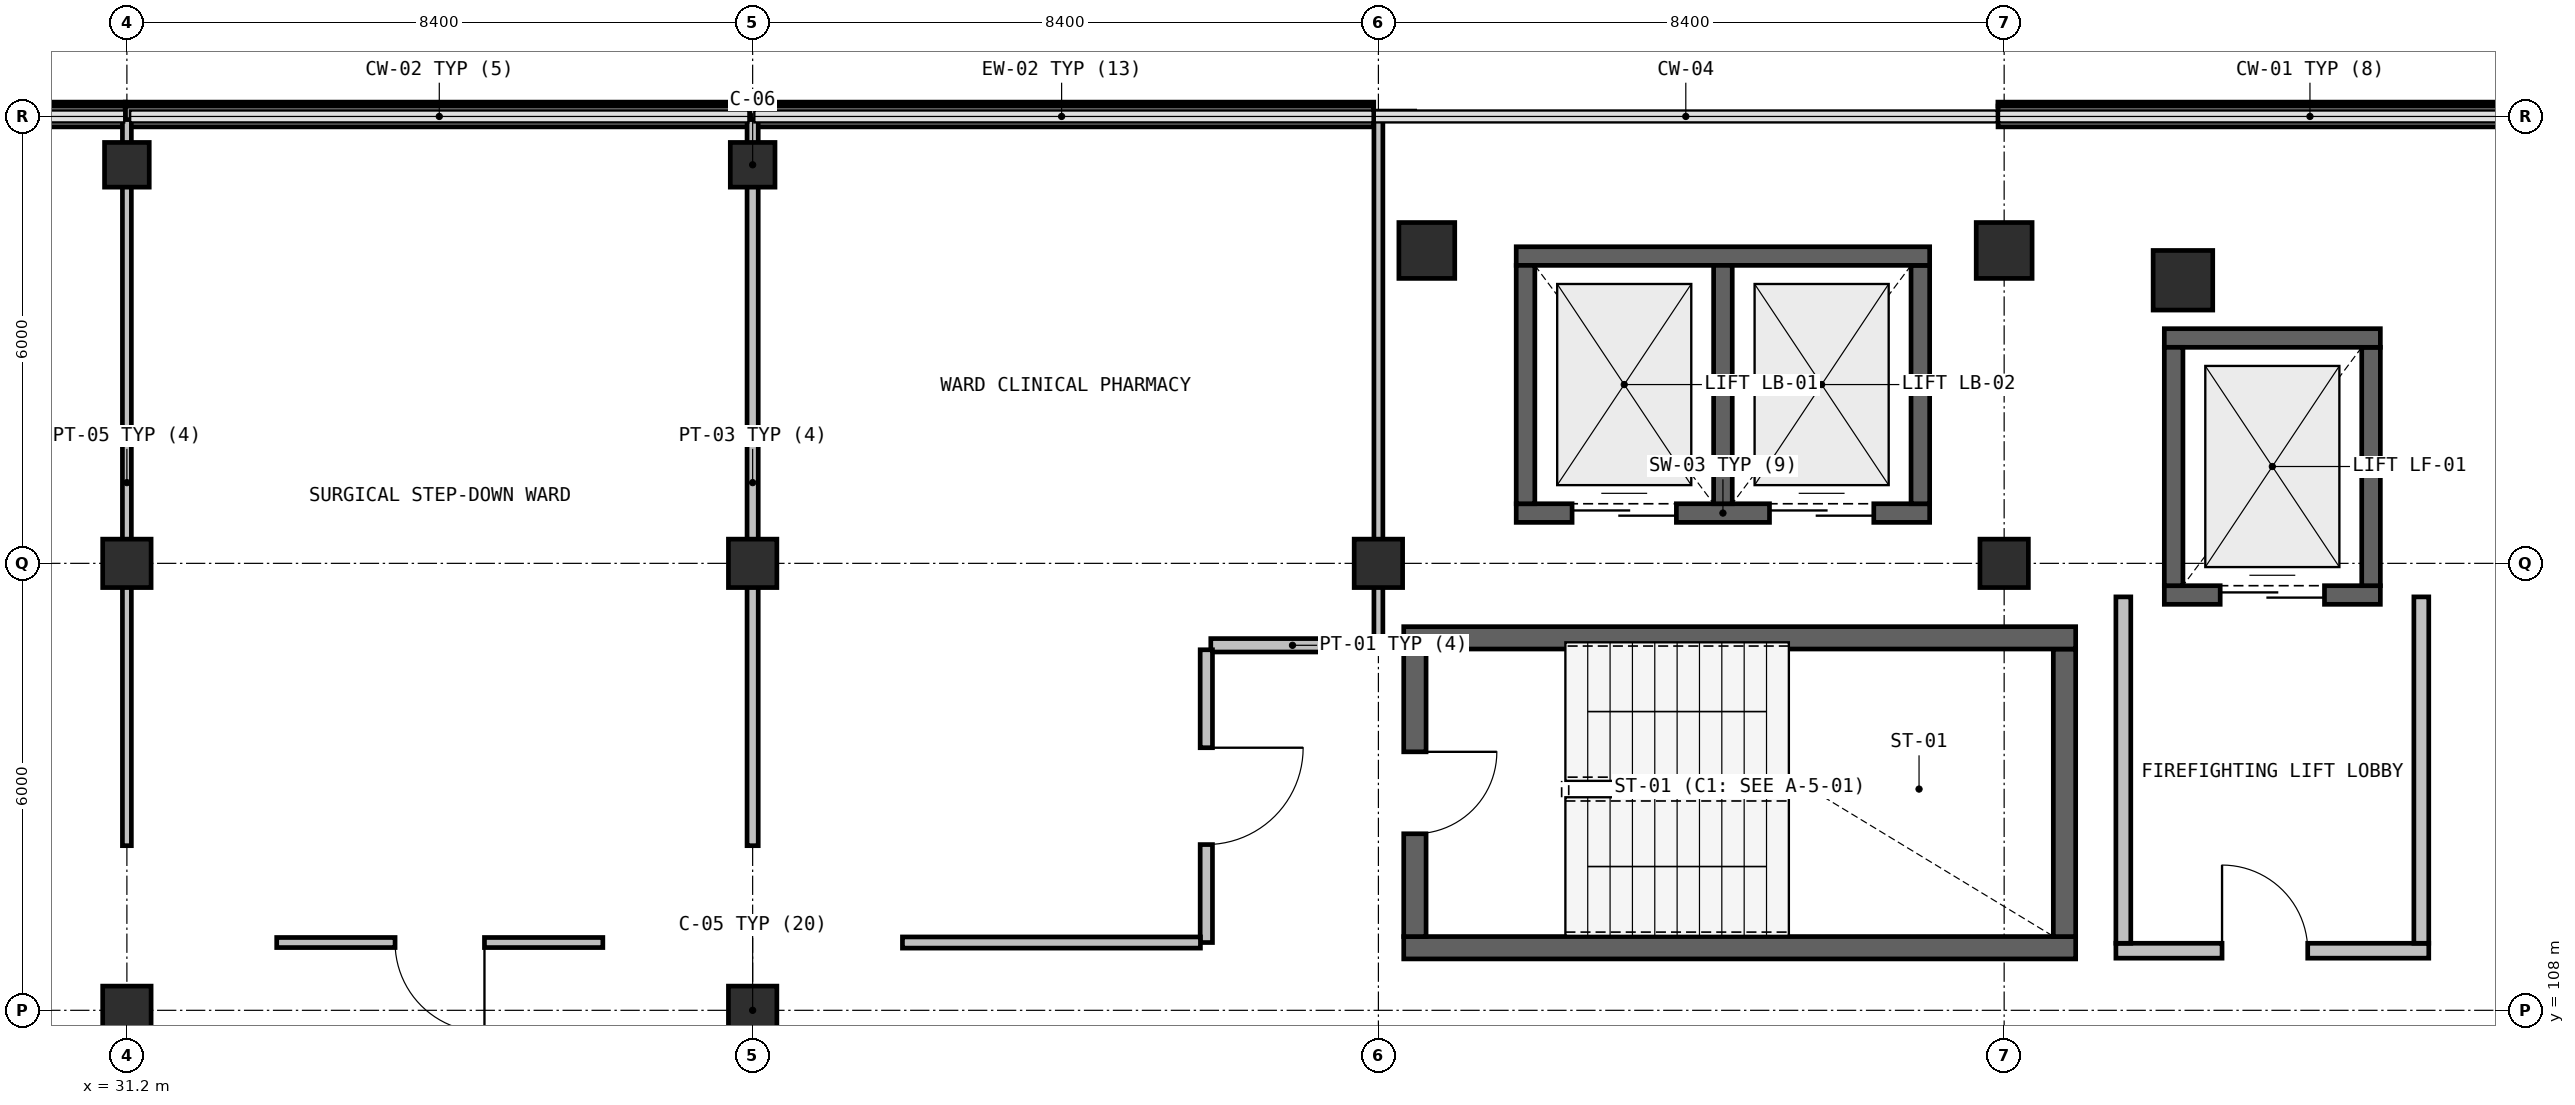
"""IFC4 building model, lengths in metres.
Left out: names, types, materials, properties, quantities, classifications, styles, units other than length and angle.
Written with IfcOpenShell. Run it as: python <this file> out.ifc"""

import sys

from ifc_helpers import new_model, si_unit, direction, frame, frame_2d, origin, origin_2d, place, context, subcontext, project, spatial, rectangle, extrude, element, fill, save


model = new_model("IFC4")
c1 = context("Model", 3, precision=1e-05, world=origin(), true_north=direction((0.0, 1.0)))
c2 = subcontext(c1, "Body", "Model", "MODEL_VIEW")
j1 = project(units=[si_unit("LENGTHUNIT", "METRE"), si_unit("PLANEANGLEUNIT", "RADIAN")], contexts=[c1])
p1 = place(None, origin())
s1 = spatial("IfcSite", under=j1, at=p1, CompositionType="ELEMENT")
p2 = place(p1, origin())
s2 = spatial("IfcBuilding", under=s1, at=p2, CompositionType="ELEMENT")
p3 = place(p2, frame((0.0, 0.0, 23.25)))
s3 = spatial("IfcBuildingStorey", under=s2, at=p3, CompositionType="ELEMENT", Elevation=23.25)
p4 = place(p3, frame((58.8, 117.8, 0.0), z_axis=(0.0, 0.0, 1.0), x_axis=(1.0, 0.0, 0.0)))
e1 = element("IfcColumn", 1, at=p4, inside=s3, PredefinedType="COLUMN", context=c2, shape_type="SweptSolid", body=[
    extrude(rectangle(XDim=0.8, YDim=0.8, at=origin_2d()), origin(), (0.0, 0.0, 1.0), 4.05),
])
for number, where, z_axis, x_axis in (
    (2, (48.65, 118.2, 0.0), (0.0, 0.0, 1.0), (1.0, 0.0, 0.0)),
    (3, (56.4, 118.2, 0.0), (0.0, 0.0, 1.0), (1.0, 0.0, 0.0)),
):
    element("IfcColumn", number, at=place(p3, frame(where, z_axis=z_axis, x_axis=x_axis)), inside=s3, PredefinedType="COLUMN", context=c2, shape_type="SweptSolid", body=[
        extrude(rectangle(XDim=0.75, YDim=0.75, at=origin_2d()), origin(), (0.0, 0.0, 1.0), 4.05),
    ])
for number, where, z_axis, x_axis in (
    (4, (31.2, 108.0, 0.0), (0.0, 0.0, 1.0), (1.0, 0.0, 0.0)),
    (5, (31.2, 114.0, 0.0), (0.0, 0.0, 1.0), (1.0, 0.0, 0.0)),
):
    element("IfcColumn", number, at=place(p3, frame(where, z_axis=z_axis, x_axis=x_axis)), inside=s3, PredefinedType="COLUMN", context=c2, shape_type="SweptSolid", body=[
        extrude(rectangle(XDim=0.65, YDim=0.65, at=origin_2d()), origin(), (0.0, 0.0, 1.0), 4.05),
    ])
p5 = place(p3, frame((31.2, 119.35, 0.0), z_axis=(0.0, 0.0, 1.0), x_axis=(1.0, 0.0, 0.0)))
e6 = element("IfcColumn", 6, at=p5, inside=s3, PredefinedType="COLUMN", context=c2, shape_type="SweptSolid", body=[
    extrude(rectangle(XDim=0.6, YDim=0.6, at=origin_2d()), origin(), (0.0, 0.0, 1.0), 4.05),
])
for number, where, z_axis, x_axis in (
    (7, (39.6, 108.0, 0.0), (0.0, 0.0, 1.0), (1.0, 0.0, 0.0)),
    (8, (39.6, 114.0, 0.0), (0.0, 0.0, 1.0), (1.0, 0.0, 0.0)),
):
    element("IfcColumn", number, at=place(p3, frame(where, z_axis=z_axis, x_axis=x_axis)), inside=s3, PredefinedType="COLUMN", context=c2, shape_type="SweptSolid", body=[
        extrude(rectangle(XDim=0.65, YDim=0.65, at=origin_2d()), origin(), (0.0, 0.0, 1.0), 4.05),
    ])
p6 = place(p3, frame((39.6, 119.35, 0.0), z_axis=(0.0, 0.0, 1.0), x_axis=(1.0, 0.0, 0.0)))
e9 = element("IfcColumn", 9, at=p6, inside=s3, PredefinedType="COLUMN", context=c2, shape_type="SweptSolid", body=[
    extrude(rectangle(XDim=0.6, YDim=0.6, at=origin_2d()), origin(), (0.0, 0.0, 1.0), 4.05),
])
for number, where, z_axis, x_axis in (
    (10, (48.0, 114.0, 0.0), (0.0, 0.0, 1.0), (1.0, 0.0, 0.0)),
    (11, (56.4, 114.0, 0.0), (0.0, 0.0, 1.0), (1.0, 0.0, 0.0)),
):
    element("IfcColumn", number, at=place(p3, frame(where, z_axis=z_axis, x_axis=x_axis)), inside=s3, PredefinedType="COLUMN", context=c2, shape_type="SweptSolid", body=[
        extrude(rectangle(XDim=0.65, YDim=0.65, at=origin_2d()), origin(), (0.0, 0.0, 1.0), 4.05),
    ])
p7 = place(p3, frame((22.94, 119.999, 0.0), z_axis=(0.0, 0.0, 1.0), x_axis=(1.0, 0.0, 0.0)))
e12 = element("IfcWall", 12, at=p7, inside=s3, PredefinedType="SOLIDWALL", context=c2, shape_type="SweptSolid", body=[
    extrude(rectangle(XDim=8.237, YDim=0.28, at=frame_2d((4.119, 0.0))), origin(), (0.0, 0.0, 1.0), 0.94),
])
for number, where, z_axis, x_axis in (
    (13, (31.181, 119.999, 0.0), (0.0, 0.0, 1.0), (1.0, 0.0, 0.0)),
    (14, (39.56, 119.999, 0.0), (0.0, 0.0, 1.0), (1.0, 0.0, 0.0)),
):
    element("IfcWall", number, at=place(p3, frame(where, z_axis=z_axis, x_axis=x_axis)), inside=s3, PredefinedType="SOLIDWALL", context=c2, shape_type="SweptSolid", body=[
        extrude(rectangle(XDim=8.375, YDim=0.28, at=frame_2d((4.188, 0.0))), origin(), (0.0, 0.0, 1.0), 0.94),
    ])
p8 = place(p3, frame((56.318, 119.999, 0.0), z_axis=(0.0, 0.0, 1.0), x_axis=(1.0, 0.0, 0.0)))
e15 = element("IfcWall", 15, at=p8, inside=s3, PredefinedType="SOLIDWALL", context=c2, shape_type="SweptSolid", body=[
    extrude(rectangle(XDim=8.374, YDim=0.28, at=frame_2d((4.187, 0.0))), origin(), (0.0, 0.0, 1.0), 0.94),
])
p9 = place(p3, frame((48.34, 108.84, 0.0), z_axis=(0.0, 0.0, 1.0), x_axis=(1.0, 0.0, 0.0)))
e16 = element("IfcWall", 16, at=p9, inside=s3, PredefinedType="SHEAR", context=c2, shape_type="SweptSolid", body=[
    extrude(rectangle(XDim=9.02, YDim=0.3, at=frame_2d((4.51, 0.0))), origin(), (0.0, 0.0, 1.0), 3.775),
])
p10 = place(p3, frame((57.21, 108.99, 0.0), z_axis=(0.0, 0.0, 1.0), x_axis=(0.0, 1.0, 0.0)))
e17 = element("IfcWall", 17, at=p10, inside=s3, PredefinedType="SHEAR", context=c2, shape_type="SweptSolid", body=[
    extrude(rectangle(XDim=3.86, YDim=0.3, at=frame_2d((1.93, 0.0))), origin(), (0.0, 0.0, 1.0), 3.775),
])
p11 = place(p3, frame((57.36, 113.0, 0.0), z_axis=(0.0, 0.0, 1.0), x_axis=(-1.0, 0.0, 0.0)))
e18 = element("IfcWall", 18, at=p11, inside=s3, PredefinedType="SHEAR", context=c2, shape_type="SweptSolid", body=[
    extrude(rectangle(XDim=9.02, YDim=0.3, at=frame_2d((4.51, 0.0))), origin(), (0.0, 0.0, 1.0), 3.775),
])
p12 = place(p3, frame((48.49, 112.85, 0.0), z_axis=(0.0, 0.0, 1.0), x_axis=(0.0, -1.0, 0.0)))
e19 = element("IfcWall", 19, at=p12, inside=s3, PredefinedType="SHEAR", context=c2, shape_type="SweptSolid", body=[
    extrude(rectangle(XDim=3.86, YDim=0.3, at=frame_2d((1.93, 0.0))), origin(), (0.0, 0.0, 1.0), 3.775),
])
p13 = place(p12, frame((1.38, 0.0, 0.0)))
e20 = element("IfcOpeningElement", 20, at=p13, cuts=e19, PredefinedType="OPENING", context=c2, shape_type="SweptSolid", body=[
    extrude(rectangle(XDim=1.1, YDim=2.15, at=frame_2d((0.55, 1.075))), frame((0.0, 0.16, 0.0), z_axis=(0.0, -1.0, 0.0), x_axis=(1.0, 0.0, 0.0)), (0.0, 0.0, 1.0), 0.32),
])
p14 = place(p3, frame((57.9, 108.8, 0.0), z_axis=(0.0, 0.0, 1.0), x_axis=(1.0, 0.0, 0.0)))
e21 = element("IfcWall", 21, at=p14, inside=s3, PredefinedType="SOLIDWALL", context=c2, shape_type="SweptSolid", body=[
    extrude(rectangle(XDim=4.2, YDim=0.2, at=frame_2d((2.1, 0.0))), origin(), (0.0, 0.0, 1.0), 3.775),
])
p15 = place(p14, frame((1.425, 0.0, 0.0)))
e22 = element("IfcOpeningElement", 22, at=p15, cuts=e21, PredefinedType="OPENING", context=c2, shape_type="SweptSolid", body=[
    extrude(rectangle(XDim=1.15, YDim=2.15, at=frame_2d((0.575, 1.075))), frame((0.0, 0.11, 0.0), z_axis=(0.0, -1.0, 0.0), x_axis=(1.0, 0.0, 0.0)), (0.0, 0.0, 1.0), 0.22),
])
for number, where, z_axis, x_axis in (
    (23, (62.0, 108.9, 0.0), (0.0, 0.0, 1.0), (0.0, 1.0, 0.0)),
    (24, (58.0, 113.55, 0.0), (0.0, 0.0, 1.0), (0.0, -1.0, 0.0)),
):
    element("IfcWall", number, at=place(p3, frame(where, z_axis=z_axis, x_axis=x_axis)), inside=s3, PredefinedType="SOLIDWALL", context=c2, shape_type="SweptSolid", body=[
        extrude(rectangle(XDim=4.65, YDim=0.2, at=frame_2d((2.325, 0.0))), origin(), (0.0, 0.0, 1.0), 3.775),
    ])
p16 = place(p3, frame((58.55, 113.575, 0.0), z_axis=(0.0, 0.0, 1.0), x_axis=(1.0, 0.0, 0.0)))
e25 = element("IfcWall", 25, at=p16, inside=s3, PredefinedType="SHEAR", context=c2, shape_type="SweptSolid", body=[
    extrude(rectangle(XDim=2.9, YDim=0.25, at=frame_2d((1.45, 0.0))), origin(), (0.0, 0.0, 1.0), 3.775),
])
p17 = place(p16, frame((0.75, 0.0, 0.0)))
e26 = element("IfcOpeningElement", 26, at=p17, cuts=e25, PredefinedType="OPENING", context=c2, shape_type="SweptSolid", body=[
    extrude(rectangle(XDim=1.4, YDim=2.15, at=frame_2d((0.7, 1.075))), frame((0.0, 0.135, 0.0), z_axis=(0.0, -1.0, 0.0), x_axis=(1.0, 0.0, 0.0)), (0.0, 0.0, 1.0), 0.27),
])
p18 = place(p3, frame((61.325, 113.7, 0.0), z_axis=(0.0, 0.0, 1.0), x_axis=(0.0, 1.0, 0.0)))
e27 = element("IfcWall", 27, at=p18, inside=s3, PredefinedType="SHEAR", context=c2, shape_type="SweptSolid", body=[
    extrude(rectangle(XDim=3.2, YDim=0.25, at=frame_2d((1.6, 0.0))), origin(), (0.0, 0.0, 1.0), 3.775),
])
p19 = place(p3, frame((61.45, 117.025, 0.0), z_axis=(0.0, 0.0, 1.0), x_axis=(-1.0, 0.0, 0.0)))
e28 = element("IfcWall", 28, at=p19, inside=s3, PredefinedType="SHEAR", context=c2, shape_type="SweptSolid", body=[
    extrude(rectangle(XDim=2.9, YDim=0.25, at=frame_2d((1.45, 0.0))), origin(), (0.0, 0.0, 1.0), 3.775),
])
p20 = place(p3, frame((58.675, 116.9, 0.0), z_axis=(0.0, 0.0, 1.0), x_axis=(0.0, -1.0, 0.0)))
e29 = element("IfcWall", 29, at=p20, inside=s3, PredefinedType="SHEAR", context=c2, shape_type="SweptSolid", body=[
    extrude(rectangle(XDim=3.2, YDim=0.25, at=frame_2d((1.6, 0.0))), origin(), (0.0, 0.0, 1.0), 3.775),
])
p21 = place(p3, frame((49.85, 114.675, 0.0), z_axis=(0.0, 0.0, 1.0), x_axis=(1.0, 0.0, 0.0)))
e30 = element("IfcWall", 30, at=p21, inside=s3, PredefinedType="SHEAR", context=c2, shape_type="SweptSolid", body=[
    extrude(rectangle(XDim=5.55, YDim=0.25, at=frame_2d((2.775, 0.0))), origin(), (0.0, 0.0, 1.0), 3.775),
])
p22 = place(p21, frame((0.75, 0.0, 0.0)))
e31 = element("IfcOpeningElement", 31, at=p22, cuts=e30, PredefinedType="OPENING", context=c2, shape_type="SweptSolid", body=[
    extrude(rectangle(XDim=1.4, YDim=2.2, at=frame_2d((0.7, 1.1))), frame((0.0, 0.135, 0.0), z_axis=(0.0, -1.0, 0.0), x_axis=(1.0, 0.0, 0.0)), (0.0, 0.0, 1.0), 0.27),
])
p23 = place(p21, frame((3.4, 0.0, 0.0)))
e32 = element("IfcOpeningElement", 32, at=p23, cuts=e30, PredefinedType="OPENING", context=c2, shape_type="SweptSolid", body=[
    extrude(rectangle(XDim=1.4, YDim=2.2, at=frame_2d((0.7, 1.1))), frame((0.0, 0.135, 0.0), z_axis=(0.0, -1.0, 0.0), x_axis=(1.0, 0.0, 0.0)), (0.0, 0.0, 1.0), 0.27),
])
p24 = place(p3, frame((55.275, 114.8, 0.0), z_axis=(0.0, 0.0, 1.0), x_axis=(0.0, 1.0, 0.0)))
e33 = element("IfcWall", 33, at=p24, inside=s3, PredefinedType="SHEAR", context=c2, shape_type="SweptSolid", body=[
    extrude(rectangle(XDim=3.2, YDim=0.25, at=frame_2d((1.6, 0.0))), origin(), (0.0, 0.0, 1.0), 3.775),
])
p25 = place(p3, frame((55.4, 118.125, 0.0), z_axis=(0.0, 0.0, 1.0), x_axis=(-1.0, 0.0, 0.0)))
e34 = element("IfcWall", 34, at=p25, inside=s3, PredefinedType="SHEAR", context=c2, shape_type="SweptSolid", body=[
    extrude(rectangle(XDim=5.55, YDim=0.25, at=frame_2d((2.775, 0.0))), origin(), (0.0, 0.0, 1.0), 3.775),
])
for number, where, z_axis, x_axis in (
    (35, (49.975, 118.0, 0.0), (0.0, 0.0, 1.0), (0.0, -1.0, 0.0)),
    (36, (52.625, 114.8, 0.0), (0.0, 0.0, 1.0), (0.0, 1.0, 0.0)),
):
    element("IfcWall", number, at=place(p3, frame(where, z_axis=z_axis, x_axis=x_axis)), inside=s3, PredefinedType="SHEAR", context=c2, shape_type="SweptSolid", body=[
        extrude(rectangle(XDim=3.2, YDim=0.25, at=frame_2d((1.6, 0.0))), origin(), (0.0, 0.0, 1.0), 3.775),
    ])
p26 = place(p3, frame((31.2, 119.957, 0.0), z_axis=(0.0, 0.0, 1.0), x_axis=(0.0, -1.0, 0.0)))
e37 = element("IfcWall", 37, at=p26, inside=s3, PredefinedType="PARTITIONING", context=c2, shape_type="SweptSolid", body=[
    extrude(rectangle(XDim=9.747, YDim=0.12, at=frame_2d((4.874, 0.0))), origin(), (0.0, 0.0, 1.0), 3.175),
])
p27 = place(p3, frame((39.6, 119.957, 0.0), z_axis=(0.0, 0.0, 1.0), x_axis=(0.0, -1.0, 0.0)))
e38 = element("IfcWall", 38, at=p27, inside=s3, PredefinedType="PARTITIONING", context=c2, shape_type="SweptSolid", body=[
    extrude(rectangle(XDim=9.747, YDim=0.15, at=frame_2d((4.874, 0.0))), origin(), (0.0, 0.0, 1.0), 3.175),
])
p28 = place(p3, frame((37.589, 108.91, 0.0), z_axis=(0.0, 0.0, 1.0), x_axis=(-1.0, 0.0, 0.0)))
e39 = element("IfcWall", 39, at=p28, inside=s3, PredefinedType="PARTITIONING", context=c2, shape_type="SweptSolid", body=[
    extrude(rectangle(XDim=4.378, YDim=0.135, at=frame_2d((2.189, 0.0))), origin(), (0.0, 0.0, 1.0), 3.775),
])
p29 = place(p28, frame((1.589, 0.0, 0.0)))
e40 = element("IfcOpeningElement", 40, at=p29, cuts=e39, PredefinedType="OPENING", context=c2, shape_type="SweptSolid", body=[
    extrude(rectangle(XDim=1.2, YDim=2.15, at=frame_2d((0.6, 1.075))), frame((0.0, 0.077, 0.0), z_axis=(0.0, -1.0, 0.0), x_axis=(1.0, 0.0, 0.0)), (0.0, 0.0, 1.0), 0.155),
])
p30 = place(p3, frame((48.0, 119.988, 0.0), z_axis=(0.0, 0.0, 1.0), x_axis=(0.0, -1.0, 0.0)))
e41 = element("IfcWall", 41, at=p30, inside=s3, PredefinedType="PARTITIONING", context=c2, shape_type="SweptSolid", body=[
    extrude(rectangle(XDim=7.088, YDim=0.12, at=frame_2d((3.544, 0.0))), origin(), (0.0, 0.0, 1.0), 3.175),
])
p31 = place(p3, frame((47.944, 112.9, 0.0), z_axis=(0.0, 0.0, 1.0), x_axis=(-1.0, 0.0, 0.0)))
e42 = element("IfcWall", 42, at=p31, inside=s3, PredefinedType="PARTITIONING", context=c2, shape_type="SweptSolid", body=[
    extrude(rectangle(XDim=2.194, YDim=0.18, at=frame_2d((1.097, 0.0))), origin(), (0.0, 0.0, 1.0), 3.775),
])
p32 = place(p3, frame((45.69, 112.84, 0.0), z_axis=(0.0, 0.0, 1.0), x_axis=(0.0, -1.0, 0.0)))
e43 = element("IfcWall", 43, at=p32, inside=s3, PredefinedType="PARTITIONING", context=c2, shape_type="SweptSolid", body=[
    extrude(rectangle(XDim=3.93, YDim=0.165, at=frame_2d((1.965, 0.0))), origin(), (0.0, 0.0, 1.0), 3.775),
])
p33 = place(p32, frame((1.315, 0.0, 0.0)))
e44 = element("IfcOpeningElement", 44, at=p33, cuts=e43, PredefinedType="OPENING", context=c2, shape_type="SweptSolid", body=[
    extrude(rectangle(XDim=1.3, YDim=2.15, at=frame_2d((0.65, 1.075))), frame((0.0, 0.093, 0.0), z_axis=(0.0, -1.0, 0.0), x_axis=(1.0, 0.0, 0.0)), (0.0, 0.0, 1.0), 0.185),
])
p34 = place(p3, frame((45.611, 108.91, 0.0), z_axis=(0.0, 0.0, 1.0), x_axis=(-1.0, 0.0, 0.0)))
e45 = element("IfcWall", 45, at=p34, inside=s3, PredefinedType="PARTITIONING", context=c2, shape_type="SweptSolid", body=[
    extrude(rectangle(XDim=4.0, YDim=0.15, at=frame_2d((2.0, 0.0))), origin(), (0.0, 0.0, 1.0), 3.775),
])
p35 = place(p13, origin())
e46 = element("IfcDoor", 46, at=p35, inside=s3, OperationType="SINGLE_SWING_LEFT", PredefinedType="DOOR", context=c2, shape_type="SweptSolid", body=[
    extrude(rectangle(XDim=1.1, YDim=2.15, at=frame_2d((0.55, 1.075))), frame((0.0, 0.025, 0.0), z_axis=(0.0, -1.0, 0.0), x_axis=(1.0, 0.0, 0.0)), (0.0, 0.0, 1.0), 0.05),
])
fill(e20, e46)
p36 = place(p15, origin())
e47 = element("IfcDoor", 47, at=p36, inside=s3, OperationType="SINGLE_SWING_RIGHT", PredefinedType="DOOR", context=c2, shape_type="SweptSolid", body=[
    extrude(rectangle(XDim=1.15, YDim=2.15, at=frame_2d((0.575, 1.075))), frame((0.0, 0.025, 0.0), z_axis=(0.0, -1.0, 0.0), x_axis=(1.0, 0.0, 0.0)), (0.0, 0.0, 1.0), 0.05),
])
fill(e22, e47)
p37 = place(p17, origin())
e48 = element("IfcDoor", 48, at=p37, inside=s3, OperationType="DOUBLE_DOOR_SLIDING", PredefinedType="DOOR", context=c2, shape_type="SweptSolid", body=[
    extrude(rectangle(XDim=1.4, YDim=2.15, at=frame_2d((0.7, 1.075))), frame((0.0, 0.025, 0.0), z_axis=(0.0, -1.0, 0.0), x_axis=(1.0, 0.0, 0.0)), (0.0, 0.0, 1.0), 0.05),
])
fill(e26, e48)
p38 = place(p22, origin())
e49 = element("IfcDoor", 49, at=p38, inside=s3, OperationType="DOUBLE_DOOR_SLIDING", PredefinedType="DOOR", context=c2, shape_type="SweptSolid", body=[
    extrude(rectangle(XDim=1.4, YDim=2.2, at=frame_2d((0.7, 1.1))), frame((0.0, 0.025, 0.0), z_axis=(0.0, -1.0, 0.0), x_axis=(1.0, 0.0, 0.0)), (0.0, 0.0, 1.0), 0.05),
])
fill(e31, e49)
p39 = place(p23, origin())
e50 = element("IfcDoor", 50, at=p39, inside=s3, OperationType="DOUBLE_DOOR_SLIDING", PredefinedType="DOOR", context=c2, shape_type="SweptSolid", body=[
    extrude(rectangle(XDim=1.4, YDim=2.2, at=frame_2d((0.7, 1.1))), frame((0.0, 0.025, 0.0), z_axis=(0.0, -1.0, 0.0), x_axis=(1.0, 0.0, 0.0)), (0.0, 0.0, 1.0), 0.05),
])
fill(e32, e50)
p40 = place(p29, origin())
e51 = element("IfcDoor", 51, at=p40, inside=s3, OperationType="SINGLE_SWING_RIGHT", PredefinedType="DOOR", context=c2, shape_type="SweptSolid", body=[
    extrude(rectangle(XDim=1.2, YDim=2.15, at=frame_2d((0.6, 1.075))), frame((0.0, 0.025, 0.0), z_axis=(0.0, -1.0, 0.0), x_axis=(1.0, 0.0, 0.0)), (0.0, 0.0, 1.0), 0.05),
])
fill(e40, e51)
p41 = place(p33, origin())
e52 = element("IfcDoor", 52, at=p41, inside=s3, OperationType="SINGLE_SWING_LEFT", PredefinedType="DOOR", context=c2, shape_type="SweptSolid", body=[
    extrude(rectangle(XDim=1.3, YDim=2.15, at=frame_2d((0.65, 1.075))), frame((0.0, 0.025, 0.0), z_axis=(0.0, -1.0, 0.0), x_axis=(1.0, 0.0, 0.0)), (0.0, 0.0, 1.0), 0.05),
])
fill(e44, e52)
save(model, sys.argv[1])
